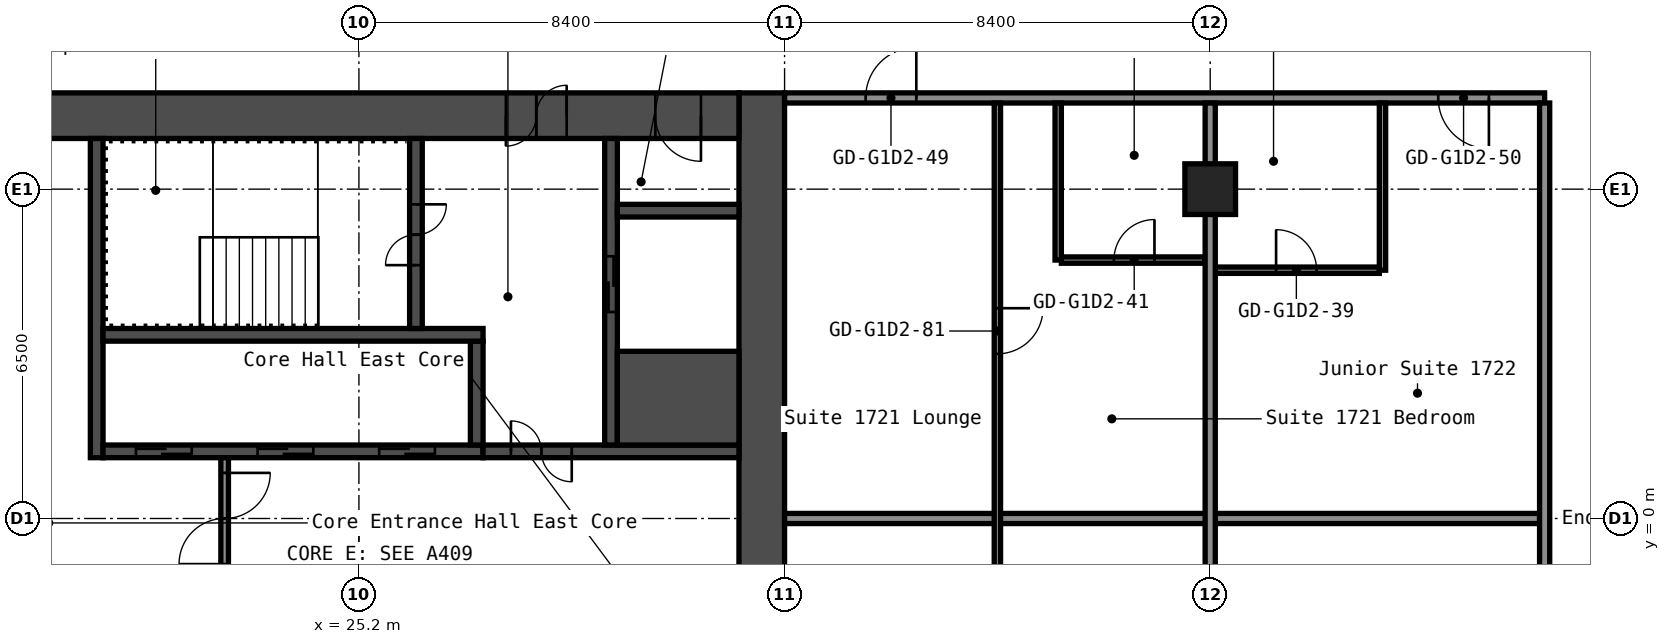
"""IFC4 building model, lengths in metres.
Left out: names, types, materials, properties, quantities, classifications, styles, units other than length and angle.
Written with IfcOpenShell. Run it as: python <this file> out.ifc"""

import sys

from ifc_helpers import new_model, si_unit, direction, frame, frame_2d, origin, origin_2d, place, context, subcontext, project, spatial, rectangle, hollow_rectangle, extrude, element, fill, save


model = new_model("IFC4")
c1 = context("Model", 3, precision=1e-05, world=origin(), true_north=direction((0.0, 1.0)))
c2 = subcontext(c1, "Body", "Model", "MODEL_VIEW")
j1 = project(units=[si_unit("LENGTHUNIT", "METRE"), si_unit("PLANEANGLEUNIT", "RADIAN")], contexts=[c1])
p1 = place(None, origin())
s1 = spatial("IfcSite", under=j1, at=p1, CompositionType="ELEMENT")
p2 = place(p1, origin())
s2 = spatial("IfcBuilding", under=s1, at=p2, CompositionType="ELEMENT")
p3 = place(p2, frame((0.0, 0.0, 61.4)))
s3 = spatial("IfcBuildingStorey", under=s2, at=p3, CompositionType="ELEMENT", Elevation=61.4)
p4 = place(p3, frame((42.0, 6.5, 0.0), z_axis=(0.0, 0.0, 1.0), x_axis=(1.0, 0.0, 0.0)))
e1 = element("IfcColumn", 1, at=p4, inside=s3, PredefinedType="COLUMN", context=c2, shape_type="SweptSolid", body=[
    extrude(hollow_rectangle(XDim=1.0, YDim=1.0, WallThickness=0.04, at=origin_2d()), origin(), (0.0, 0.0, 1.0), 2.9),
])
p5 = place(p3, frame((33.15, -8.4, 0.0), z_axis=(0.0, 0.0, 1.0), x_axis=(0.0, 1.0, 0.0)))
e2 = element("IfcWall", 2, at=p5, inside=s3, PredefinedType="SHEAR", context=c2, shape_type="SweptSolid", body=[
    extrude(rectangle(XDim=16.8, YDim=0.9, at=frame_2d((8.4, 0.0))), origin(), (0.0, 0.0, 1.0), 2.9),
])
p6 = place(p3, frame((17.7, 7.95, 0.0), z_axis=(0.0, 0.0, 1.0), x_axis=(1.0, 0.0, 0.0)))
e3 = element("IfcWall", 3, at=p6, inside=s3, PredefinedType="SHEAR", context=c2, shape_type="SweptSolid", body=[
    extrude(rectangle(XDim=15.0, YDim=0.9, at=frame_2d((7.5, 0.0))), origin(), (0.0, 0.0, 1.0), 2.9),
])
p7 = place(p6, frame((10.4, 0.0, 0.0)))
e4 = element("IfcOpeningElement", 4, at=p7, cuts=e3, PredefinedType="OPENING", context=c2, shape_type="SweptSolid", body=[
    extrude(rectangle(XDim=1.2, YDim=2.1, at=frame_2d((0.6, 1.05))), frame((0.0, 0.46, 0.0), z_axis=(0.0, -1.0, 0.0), x_axis=(1.0, 0.0, 0.0)), (0.0, 0.0, 1.0), 0.92),
])
p8 = place(p6, frame((13.35, 0.0, 0.0)))
e5 = element("IfcOpeningElement", 5, at=p8, cuts=e3, PredefinedType="OPENING", context=c2, shape_type="SweptSolid", body=[
    extrude(rectangle(XDim=0.9, YDim=2.1, at=frame_2d((0.45, 1.05))), frame((0.0, 0.46, 0.0), z_axis=(0.0, -1.0, 0.0), x_axis=(1.0, 0.0, 0.0)), (0.0, 0.0, 1.0), 0.92),
])
p9 = place(p3, frame((20.025, 1.2, 0.0), z_axis=(0.0, 0.0, 1.0), x_axis=(0.0, 1.0, 0.0)))
e6 = element("IfcWall", 6, at=p9, inside=s3, PredefinedType="SHEAR", context=c2, shape_type="SweptSolid", body=[
    extrude(rectangle(XDim=6.3, YDim=0.25, at=frame_2d((3.15, 0.0))), origin(), (0.0, 0.0, 1.0), 2.9),
])
p10 = place(p3, frame((20.15, 1.325, 0.0), z_axis=(0.0, 0.0, 1.0), x_axis=(1.0, 0.0, 0.0)))
e7 = element("IfcWall", 7, at=p10, inside=s3, PredefinedType="SHEAR", context=c2, shape_type="SweptSolid", body=[
    extrude(rectangle(XDim=7.5, YDim=0.25, at=frame_2d((3.75, 0.0))), origin(), (0.0, 0.0, 1.0), 2.9),
])
p11 = place(p10, frame((0.65, 0.0, 0.0)))
e8 = element("IfcOpeningElement", 8, at=p11, cuts=e7, PredefinedType="OPENING", context=c2, shape_type="SweptSolid", body=[
    extrude(rectangle(XDim=1.1, YDim=2.1, at=frame_2d((0.55, 1.05))), frame((0.0, 0.135, 0.0), z_axis=(0.0, -1.0, 0.0), x_axis=(1.0, 0.0, 0.0)), (0.0, 0.0, 1.0), 0.27),
])
p12 = place(p10, frame((3.05, 0.0, 0.0)))
e9 = element("IfcOpeningElement", 9, at=p12, cuts=e7, PredefinedType="OPENING", context=c2, shape_type="SweptSolid", body=[
    extrude(rectangle(XDim=1.1, YDim=2.1, at=frame_2d((0.55, 1.05))), frame((0.0, 0.135, 0.0), z_axis=(0.0, -1.0, 0.0), x_axis=(1.0, 0.0, 0.0)), (0.0, 0.0, 1.0), 0.27),
])
p13 = place(p10, frame((5.45, 0.0, 0.0)))
e10 = element("IfcOpeningElement", 10, at=p13, cuts=e7, PredefinedType="OPENING", context=c2, shape_type="SweptSolid", body=[
    extrude(rectangle(XDim=1.1, YDim=2.1, at=frame_2d((0.55, 1.05))), frame((0.0, 0.135, 0.0), z_axis=(0.0, -1.0, 0.0), x_axis=(1.0, 0.0, 0.0)), (0.0, 0.0, 1.0), 0.27),
])
p14 = place(p3, frame((27.525, 1.45, 0.0), z_axis=(0.0, 0.0, 1.0), x_axis=(0.0, 1.0, 0.0)))
e11 = element("IfcWall", 11, at=p14, inside=s3, PredefinedType="SHEAR", context=c2, shape_type="SweptSolid", body=[
    extrude(rectangle(XDim=2.05, YDim=0.25, at=frame_2d((1.025, 0.0))), origin(), (0.0, 0.0, 1.0), 2.9),
])
p15 = place(p3, frame((20.15, 3.625, 0.0), z_axis=(0.0, 0.0, 1.0), x_axis=(1.0, 0.0, 0.0)))
e12 = element("IfcWall", 12, at=p15, inside=s3, PredefinedType="SHEAR", context=c2, shape_type="SweptSolid", body=[
    extrude(rectangle(XDim=7.5, YDim=0.25, at=frame_2d((3.75, 0.0))), origin(), (0.0, 0.0, 1.0), 2.9),
])
p16 = place(p3, frame((26.325, 3.75, 0.0), z_axis=(0.0, 0.0, 1.0), x_axis=(0.0, 1.0, 0.0)))
e13 = element("IfcWall", 13, at=p16, inside=s3, PredefinedType="SHEAR", context=c2, shape_type="SweptSolid", body=[
    extrude(rectangle(XDim=3.75, YDim=0.25, at=frame_2d((1.875, 0.0))), origin(), (0.0, 0.0, 1.0), 2.9),
])
p17 = place(p16, frame((1.25, 0.0, 0.0)))
e14 = element("IfcOpeningElement", 14, at=p17, cuts=e13, PredefinedType="OPENING", context=c2, shape_type="SweptSolid", body=[
    extrude(rectangle(XDim=1.2, YDim=2.1, at=frame_2d((0.6, 1.05))), frame((0.0, 0.135, 0.0), z_axis=(0.0, -1.0, 0.0), x_axis=(1.0, 0.0, 0.0)), (0.0, 0.0, 1.0), 0.27),
])
p18 = place(p3, frame((27.65, 1.325, 0.0), z_axis=(0.0, 0.0, 1.0), x_axis=(1.0, 0.0, 0.0)))
e15 = element("IfcWall", 15, at=p18, inside=s3, PredefinedType="SHEAR", context=c2, shape_type="SweptSolid", body=[
    extrude(rectangle(XDim=5.05, YDim=0.25, at=frame_2d((2.525, 0.0))), origin(), (0.0, 0.0, 1.0), 2.9),
])
p19 = place(p18, frame((0.55, 0.0, 0.0)))
e16 = element("IfcOpeningElement", 16, at=p19, cuts=e15, PredefinedType="OPENING", context=c2, shape_type="SweptSolid", body=[
    extrude(rectangle(XDim=1.2, YDim=2.1, at=frame_2d((0.6, 1.05))), frame((0.0, 0.135, 0.0), z_axis=(0.0, -1.0, 0.0), x_axis=(1.0, 0.0, 0.0)), (0.0, 0.0, 1.0), 0.27),
])
p20 = place(p3, frame((30.175, 1.45, 0.0), z_axis=(0.0, 0.0, 1.0), x_axis=(0.0, 1.0, 0.0)))
e17 = element("IfcWall", 17, at=p20, inside=s3, PredefinedType="SHEAR", context=c2, shape_type="SweptSolid", body=[
    extrude(rectangle(XDim=6.05, YDim=0.25, at=frame_2d((3.025, 0.0))), origin(), (0.0, 0.0, 1.0), 2.9),
])
p21 = place(p20, frame((2.625, 0.0, 0.0)))
e18 = element("IfcOpeningElement", 18, at=p21, cuts=e17, PredefinedType="OPENING", context=c2, shape_type="SweptSolid", body=[
    extrude(rectangle(XDim=1.1, YDim=2.1, at=frame_2d((0.55, 1.05))), frame((0.0, 0.135, 0.0), z_axis=(0.0, -1.0, 0.0), x_axis=(1.0, 0.0, 0.0)), (0.0, 0.0, 1.0), 0.27),
])
p22 = place(p3, frame((30.3, 2.375, 0.0), z_axis=(0.0, 0.0, 1.0), x_axis=(1.0, 0.0, 0.0)))
e19 = element("IfcWall", 19, at=p22, inside=s3, PredefinedType="SHEAR", context=c2, shape_type="SweptSolid", body=[
    extrude(rectangle(XDim=2.4, YDim=1.85, at=frame_2d((1.2, 0.0))), origin(), (0.0, 0.0, 1.0), 2.9),
])
p23 = place(p3, frame((30.3, 6.075, 0.0), z_axis=(0.0, 0.0, 1.0), x_axis=(1.0, 0.0, 0.0)))
e20 = element("IfcWall", 20, at=p23, inside=s3, PredefinedType="SHEAR", context=c2, shape_type="SweptSolid", body=[
    extrude(rectangle(XDim=2.4, YDim=0.25, at=frame_2d((1.2, 0.0))), origin(), (0.0, 0.0, 1.0), 2.9),
])
p24 = place(p3, frame((22.55, -1.2, 0.0), z_axis=(0.0, 0.0, 1.0), x_axis=(0.0, 1.0, 0.0)))
e21 = element("IfcWall", 21, at=p24, inside=s3, PredefinedType="PARTITIONING", context=c2, shape_type="SweptSolid", body=[
    extrude(rectangle(XDim=2.4, YDim=0.15, at=frame_2d((1.2, 0.0))), origin(), (0.0, 0.0, 1.0), 2.9),
])
p25 = place(p24, frame((0.3, 0.0, 0.0)))
e22 = element("IfcOpeningElement", 22, at=p25, cuts=e21, PredefinedType="OPENING", context=c2, shape_type="SweptSolid", body=[
    extrude(rectangle(XDim=1.8, YDim=2.1, at=frame_2d((0.9, 1.05))), frame((0.0, 0.085, 0.0), z_axis=(0.0, -1.0, 0.0), x_axis=(1.0, 0.0, 0.0)), (0.0, 0.0, 1.0), 0.17),
])
p26 = place(p3, frame((33.6, 0.0, 0.0), z_axis=(0.0, 0.0, 1.0), x_axis=(1.0, 0.0, 0.0)))
e23 = element("IfcWall", 23, at=p26, inside=s3, PredefinedType="PARTITIONING", context=c2, shape_type="SweptSolid", body=[
    extrude(rectangle(XDim=14.9, YDim=0.2, at=frame_2d((7.45, 0.0))), origin(), (0.0, 0.0, 1.0), 2.9),
])
p27 = place(p3, frame((42.1, 4.9, 0.0), z_axis=(0.0, 0.0, 1.0), x_axis=(1.0, 0.0, 0.0)))
e24 = element("IfcWall", 24, at=p27, inside=s3, PredefinedType="PARTITIONING", context=c2, shape_type="SweptSolid", body=[
    extrude(rectangle(XDim=3.237, YDim=0.125, at=frame_2d((1.619, 0.0))), origin(), (0.0, 0.0, 1.0), 2.9),
])
p28 = place(p27, frame((1.2, 0.0, 0.0)))
e25 = element("IfcOpeningElement", 25, at=p28, cuts=e24, PredefinedType="OPENING", context=c2, shape_type="SweptSolid", body=[
    extrude(rectangle(XDim=0.8, YDim=2.1, at=frame_2d((0.4, 1.05))), frame((0.0, 0.073, 0.0), z_axis=(0.0, -1.0, 0.0), x_axis=(1.0, 0.0, 0.0)), (0.0, 0.0, 1.0), 0.145),
])
p29 = place(p3, frame((39.062, 5.1, 0.0), z_axis=(0.0, 0.0, 1.0), x_axis=(1.0, 0.0, 0.0)))
e26 = element("IfcWall", 26, at=p29, inside=s3, PredefinedType="PARTITIONING", context=c2, shape_type="SweptSolid", body=[
    extrude(rectangle(XDim=2.837, YDim=0.125, at=frame_2d((1.419, 0.0))), origin(), (0.0, 0.0, 1.0), 2.9),
])
p30 = place(p29, frame((1.038, 0.0, 0.0)))
e27 = element("IfcOpeningElement", 27, at=p30, cuts=e26, PredefinedType="OPENING", context=c2, shape_type="SweptSolid", body=[
    extrude(rectangle(XDim=0.8, YDim=2.1, at=frame_2d((0.4, 1.05))), frame((0.0, 0.073, 0.0), z_axis=(0.0, -1.0, 0.0), x_axis=(1.0, 0.0, 0.0)), (0.0, 0.0, 1.0), 0.145),
])
p31 = place(p3, frame((33.6, 8.3, 0.0), z_axis=(0.0, 0.0, 1.0), x_axis=(1.0, 0.0, 0.0)))
e28 = element("IfcWall", 28, at=p31, inside=s3, PredefinedType="PARTITIONING", context=c2, shape_type="SweptSolid", body=[
    extrude(rectangle(XDim=15.0, YDim=0.2, at=frame_2d((7.5, 0.0))), origin(), (0.0, 0.0, 1.0), 2.9),
])
p32 = place(p31, frame((1.6, 0.0, 0.0)))
e29 = element("IfcOpeningElement", 29, at=p32, cuts=e28, PredefinedType="OPENING", context=c2, shape_type="SweptSolid", body=[
    extrude(rectangle(XDim=1.0, YDim=2.1, at=frame_2d((0.5, 1.05))), frame((0.0, 0.11, 0.0), z_axis=(0.0, -1.0, 0.0), x_axis=(1.0, 0.0, 0.0)), (0.0, 0.0, 1.0), 0.22),
])
p33 = place(p31, frame((12.9, 0.0, 0.0)))
e30 = element("IfcOpeningElement", 30, at=p33, cuts=e28, PredefinedType="OPENING", context=c2, shape_type="SweptSolid", body=[
    extrude(rectangle(XDim=1.0, YDim=2.1, at=frame_2d((0.5, 1.05))), frame((0.0, 0.11, 0.0), z_axis=(0.0, -1.0, 0.0), x_axis=(1.0, 0.0, 0.0)), (0.0, 0.0, 1.0), 0.22),
])
p34 = place(p3, frame((37.8, -8.2, 0.0), z_axis=(0.0, 0.0, 1.0), x_axis=(0.0, 1.0, 0.0)))
e31 = element("IfcWall", 31, at=p34, inside=s3, PredefinedType="PARTITIONING", context=c2, shape_type="SweptSolid", body=[
    extrude(rectangle(XDim=16.4, YDim=0.125, at=frame_2d((8.2, 0.0))), origin(), (0.0, 0.0, 1.0), 2.9),
])
p35 = place(p34, frame((4.05, 0.0, 0.0)))
e32 = element("IfcOpeningElement", 32, at=p35, cuts=e31, PredefinedType="OPENING", context=c2, shape_type="SweptSolid", body=[
    extrude(rectangle(XDim=0.9, YDim=2.1, at=frame_2d((0.45, 1.05))), frame((0.0, 0.073, 0.0), z_axis=(0.0, -1.0, 0.0), x_axis=(1.0, 0.0, 0.0)), (0.0, 0.0, 1.0), 0.145),
])
p36 = place(p34, frame((11.45, 0.0, 0.0)))
e33 = element("IfcOpeningElement", 33, at=p36, cuts=e31, PredefinedType="OPENING", context=c2, shape_type="SweptSolid", body=[
    extrude(rectangle(XDim=0.9, YDim=2.1, at=frame_2d((0.45, 1.05))), frame((0.0, 0.073, 0.0), z_axis=(0.0, -1.0, 0.0), x_axis=(1.0, 0.0, 0.0)), (0.0, 0.0, 1.0), 0.145),
])
p37 = place(p3, frame((39.0, 5.1, 0.0), z_axis=(0.0, 0.0, 1.0), x_axis=(0.0, 1.0, 0.0)))
e34 = element("IfcWall", 34, at=p37, inside=s3, PredefinedType="PARTITIONING", context=c2, shape_type="SweptSolid", body=[
    extrude(rectangle(XDim=3.1, YDim=0.125, at=frame_2d((1.55, 0.0))), origin(), (0.0, 0.0, 1.0), 2.9),
])
p38 = place(p3, frame((42.0, -8.2, 0.0), z_axis=(0.0, 0.0, 1.0), x_axis=(0.0, 1.0, 0.0)))
e35 = element("IfcWall", 35, at=p38, inside=s3, PredefinedType="PARTITIONING", context=c2, shape_type="SweptSolid", body=[
    extrude(rectangle(XDim=16.4, YDim=0.2, at=frame_2d((8.2, 0.0))), origin(), (0.0, 0.0, 1.0), 2.9),
])
p39 = place(p3, frame((45.4, 4.9, 0.0), z_axis=(0.0, 0.0, 1.0), x_axis=(0.0, 1.0, 0.0)))
e36 = element("IfcWall", 36, at=p39, inside=s3, PredefinedType="PARTITIONING", context=c2, shape_type="SweptSolid", body=[
    extrude(rectangle(XDim=3.3, YDim=0.125, at=frame_2d((1.65, 0.0))), origin(), (0.0, 0.0, 1.0), 2.9),
])
p40 = place(p3, frame((48.6, -8.2, 0.0), z_axis=(0.0, 0.0, 1.0), x_axis=(0.0, 1.0, 0.0)))
e37 = element("IfcWall", 37, at=p40, inside=s3, PredefinedType="PARTITIONING", context=c2, shape_type="SweptSolid", body=[
    extrude(rectangle(XDim=16.4, YDim=0.2, at=frame_2d((8.2, 0.0))), origin(), (0.0, 0.0, 1.0), 2.9),
])
p41 = place(p7, origin())
e38 = element("IfcDoor", 38, at=p41, inside=s3, OperationType="DOUBLE_DOOR_SINGLE_SWING", PredefinedType="DOOR", context=c2, shape_type="SweptSolid", body=[
    extrude(rectangle(XDim=1.2, YDim=2.1, at=frame_2d((0.6, 1.05))), frame((0.0, 0.025, 0.0), z_axis=(0.0, -1.0, 0.0), x_axis=(1.0, 0.0, 0.0)), (0.0, 0.0, 1.0), 0.05),
])
fill(e4, e38)
p42 = place(p8, origin())
e39 = element("IfcDoor", 39, at=p42, inside=s3, OperationType="SINGLE_SWING_RIGHT", PredefinedType="DOOR", context=c2, shape_type="SweptSolid", body=[
    extrude(rectangle(XDim=0.9, YDim=2.1, at=frame_2d((0.45, 1.05))), frame((0.0, 0.025, 0.0), z_axis=(0.0, -1.0, 0.0), x_axis=(1.0, 0.0, 0.0)), (0.0, 0.0, 1.0), 0.05),
])
fill(e5, e39)
p43 = place(p17, origin())
e40 = element("IfcDoor", 40, at=p43, inside=s3, OperationType="DOUBLE_DOOR_SINGLE_SWING", PredefinedType="DOOR", context=c2, shape_type="SweptSolid", body=[
    extrude(rectangle(XDim=1.2, YDim=2.1, at=frame_2d((0.6, 1.05))), frame((0.0, 0.025, 0.0), z_axis=(0.0, -1.0, 0.0), x_axis=(1.0, 0.0, 0.0)), (0.0, 0.0, 1.0), 0.05),
])
fill(e14, e40)
p44 = place(p19, origin())
e41 = element("IfcDoor", 41, at=p44, inside=s3, OperationType="DOUBLE_DOOR_SINGLE_SWING", PredefinedType="DOOR", context=c2, shape_type="SweptSolid", body=[
    extrude(rectangle(XDim=1.2, YDim=2.1, at=frame_2d((0.6, 1.05))), frame((0.0, 0.025, 0.0), z_axis=(0.0, -1.0, 0.0), x_axis=(1.0, 0.0, 0.0)), (0.0, 0.0, 1.0), 0.05),
])
fill(e16, e41)
p45 = place(p25, origin())
e42 = element("IfcDoor", 42, at=p45, inside=s3, OperationType="DOUBLE_DOOR_SINGLE_SWING", PredefinedType="DOOR", context=c2, shape_type="SweptSolid", body=[
    extrude(rectangle(XDim=1.8, YDim=2.1, at=frame_2d((0.9, 1.05))), frame((0.0, 0.025, 0.0), z_axis=(0.0, -1.0, 0.0), x_axis=(1.0, 0.0, 0.0)), (0.0, 0.0, 1.0), 0.05),
])
fill(e22, e42)
p46 = place(p11, origin())
e43 = element("IfcDoor", 43, at=p46, inside=s3, OperationType="DOUBLE_DOOR_SLIDING", PredefinedType="DOOR", context=c2, shape_type="SweptSolid", body=[
    extrude(rectangle(XDim=1.1, YDim=2.1, at=frame_2d((0.55, 1.05))), frame((0.0, 0.025, 0.0), z_axis=(0.0, -1.0, 0.0), x_axis=(1.0, 0.0, 0.0)), (0.0, 0.0, 1.0), 0.05),
])
fill(e8, e43)
p47 = place(p12, origin())
e44 = element("IfcDoor", 44, at=p47, inside=s3, OperationType="DOUBLE_DOOR_SLIDING", PredefinedType="DOOR", context=c2, shape_type="SweptSolid", body=[
    extrude(rectangle(XDim=1.1, YDim=2.1, at=frame_2d((0.55, 1.05))), frame((0.0, 0.025, 0.0), z_axis=(0.0, -1.0, 0.0), x_axis=(1.0, 0.0, 0.0)), (0.0, 0.0, 1.0), 0.05),
])
fill(e9, e44)
p48 = place(p13, origin())
e45 = element("IfcDoor", 45, at=p48, inside=s3, OperationType="DOUBLE_DOOR_SLIDING", PredefinedType="DOOR", context=c2, shape_type="SweptSolid", body=[
    extrude(rectangle(XDim=1.1, YDim=2.1, at=frame_2d((0.55, 1.05))), frame((0.0, 0.025, 0.0), z_axis=(0.0, -1.0, 0.0), x_axis=(1.0, 0.0, 0.0)), (0.0, 0.0, 1.0), 0.05),
])
fill(e10, e45)
p49 = place(p21, origin())
e46 = element("IfcDoor", 46, at=p49, inside=s3, OperationType="DOUBLE_DOOR_SLIDING", PredefinedType="DOOR", context=c2, shape_type="SweptSolid", body=[
    extrude(rectangle(XDim=1.1, YDim=2.1, at=frame_2d((0.55, 1.05))), frame((0.0, 0.025, 0.0), z_axis=(0.0, -1.0, 0.0), x_axis=(1.0, 0.0, 0.0)), (0.0, 0.0, 1.0), 0.05),
])
fill(e18, e46)
p50 = place(p28, origin())
e47 = element("IfcDoor", 47, at=p50, inside=s3, OperationType="SINGLE_SWING_RIGHT", PredefinedType="DOOR", context=c2, shape_type="SweptSolid", body=[
    extrude(rectangle(XDim=0.8, YDim=2.1, at=frame_2d((0.4, 1.05))), frame((0.0, 0.025, 0.0), z_axis=(0.0, -1.0, 0.0), x_axis=(1.0, 0.0, 0.0)), (0.0, 0.0, 1.0), 0.05),
])
fill(e25, e47)
p51 = place(p30, origin())
e48 = element("IfcDoor", 48, at=p51, inside=s3, OperationType="SINGLE_SWING_LEFT", PredefinedType="DOOR", context=c2, shape_type="SweptSolid", body=[
    extrude(rectangle(XDim=0.8, YDim=2.1, at=frame_2d((0.4, 1.05))), frame((0.0, 0.025, 0.0), z_axis=(0.0, -1.0, 0.0), x_axis=(1.0, 0.0, 0.0)), (0.0, 0.0, 1.0), 0.05),
])
fill(e27, e48)
p52 = place(p32, origin())
e49 = element("IfcDoor", 49, at=p52, inside=s3, OperationType="SINGLE_SWING_LEFT", PredefinedType="DOOR", context=c2, shape_type="SweptSolid", body=[
    extrude(rectangle(XDim=1.0, YDim=2.1, at=frame_2d((0.5, 1.05))), frame((0.0, 0.025, 0.0), z_axis=(0.0, -1.0, 0.0), x_axis=(1.0, 0.0, 0.0)), (0.0, 0.0, 1.0), 0.05),
])
fill(e29, e49)
p53 = place(p33, origin())
e50 = element("IfcDoor", 50, at=p53, inside=s3, OperationType="SINGLE_SWING_RIGHT", PredefinedType="DOOR", context=c2, shape_type="SweptSolid", body=[
    extrude(rectangle(XDim=1.0, YDim=2.1, at=frame_2d((0.5, 1.05))), frame((0.0, 0.025, 0.0), z_axis=(0.0, -1.0, 0.0), x_axis=(1.0, 0.0, 0.0)), (0.0, 0.0, 1.0), 0.05),
])
fill(e30, e50)
p54 = place(p36, origin())
e51 = element("IfcDoor", 51, at=p54, inside=s3, OperationType="SINGLE_SWING_RIGHT", PredefinedType="DOOR", context=c2, shape_type="SweptSolid", body=[
    extrude(rectangle(XDim=0.9, YDim=2.1, at=frame_2d((0.45, 1.05))), frame((0.0, 0.025, 0.0), z_axis=(0.0, -1.0, 0.0), x_axis=(1.0, 0.0, 0.0)), (0.0, 0.0, 1.0), 0.05),
])
fill(e33, e51)
save(model, sys.argv[1])
